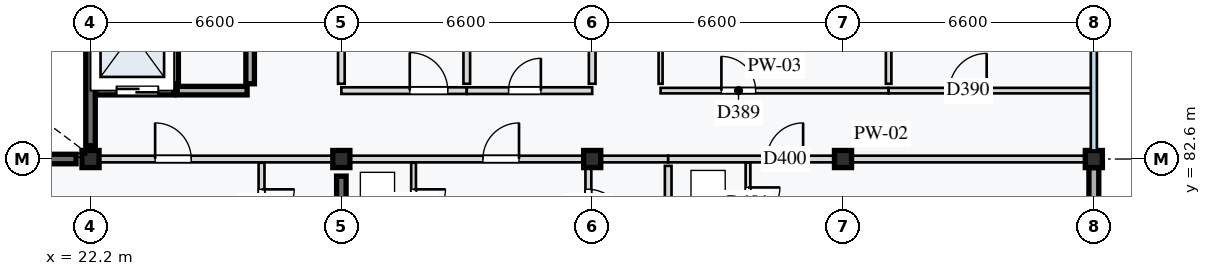
"""IFC4 building model, lengths in metres.
Left out: names, types, materials, properties, quantities, classifications, styles, units other than length and angle.
Written with IfcOpenShell. Run it as: python <this file> out.ifc"""

import sys

from ifc_helpers import new_model, si_unit, direction, frame, frame_2d, origin, origin_2d, place, context, subcontext, project, spatial, rectangle, extrude, element, fill, save


model = new_model("IFC4")
c1 = context("Model", 3, precision=1e-05, world=origin(), true_north=direction((0.0, 1.0)))
c2 = subcontext(c1, "Body", "Model", "MODEL_VIEW")
j1 = project(units=[si_unit("LENGTHUNIT", "METRE"), si_unit("PLANEANGLEUNIT", "RADIAN")], contexts=[c1])
p1 = place(None, origin())
s1 = spatial("IfcSite", under=j1, at=p1, CompositionType="ELEMENT")
p2 = place(p1, origin())
s2 = spatial("IfcBuilding", under=s1, at=p2, CompositionType="ELEMENT")
p3 = place(p2, frame((0.0, 0.0, 40.4)))
s3 = spatial("IfcBuildingStorey", under=s2, at=p3, CompositionType="ELEMENT", Elevation=40.4)
for number, where, z_axis, x_axis in (
    (1, (22.2, 82.6, 0.0), (0.0, 0.0, 1.0), (1.0, 0.0, 0.0)),
    (2, (28.8, 82.6, 0.0), (0.0, 0.0, 1.0), (1.0, 0.0, 0.0)),
    (3, (35.4, 82.6, 0.0), (0.0, 0.0, 1.0), (1.0, 0.0, 0.0)),
    (4, (42.0, 82.6, 0.0), (0.0, 0.0, 1.0), (1.0, 0.0, 0.0)),
    (5, (48.6, 82.6, 0.0), (0.0, 0.0, 1.0), (1.0, 0.0, 0.0)),
):
    element("IfcColumn", number, at=place(p3, frame(where, z_axis=z_axis, x_axis=x_axis)), inside=s3, PredefinedType="COLUMN", context=c2, shape_type="SweptSolid", body=[
        extrude(rectangle(XDim=0.45, YDim=0.45, at=origin_2d()), origin(), (0.0, 0.0, 1.0), 3.2),
    ])
p4 = place(p3, frame((15.98, 82.6, 0.0), z_axis=(0.0, 0.0, 1.0), x_axis=(1.0, 0.0, 0.0)))
e6 = element("IfcWall", 6, at=p4, inside=s3, PredefinedType="SHEAR", context=c2, shape_type="SweptSolid", body=[
    extrude(rectangle(XDim=5.84, YDim=0.25, at=frame_2d((2.92, 0.0))), origin(), (0.0, 0.0, 1.0), 2.98),
])
p5 = place(p3, frame((22.2, 82.95, 0.0), z_axis=(0.0, 0.0, 1.0), x_axis=(0.0, 1.0, 0.0)))
e7 = element("IfcWall", 7, at=p5, inside=s3, PredefinedType="SHEAR", context=c2, shape_type="SweptSolid", body=[
    extrude(rectangle(XDim=2.8, YDim=0.25, at=frame_2d((1.4, 0.0))), origin(), (0.0, 0.0, 1.0), 2.98),
])
p6 = place(p3, frame((28.8, 76.45, 0.0), z_axis=(0.0, 0.0, 1.0), x_axis=(0.0, 1.0, 0.0)))
e8 = element("IfcWall", 8, at=p6, inside=s3, PredefinedType="SHEAR", context=c2, shape_type="SweptSolid", body=[
    extrude(rectangle(XDim=5.7, YDim=0.25, at=frame_2d((2.85, 0.0))), origin(), (0.0, 0.0, 1.0), 2.98),
])
p7 = place(p3, frame((48.6, 76.225, 0.0), z_axis=(0.0, 0.0, 1.0), x_axis=(0.0, 1.0, 0.0)))
e9 = element("IfcWall", 9, at=p7, inside=s3, PredefinedType="STANDARD", context=c2, shape_type="SweptSolid", body=[
    extrude(rectangle(XDim=6.15, YDim=0.26, at=frame_2d((3.075, 0.0))), origin(), (0.0, 0.0, 1.0), 2.65),
])
p8 = place(p3, frame((22.335, 84.4, 0.0), z_axis=(0.0, 0.0, 1.0), x_axis=(1.0, 0.0, 0.0)))
e10 = element("IfcWall", 10, at=p8, inside=s3, PredefinedType="STANDARD", context=c2, shape_type="SweptSolid", body=[
    extrude(rectangle(XDim=2.065, YDim=0.225, at=frame_2d((1.032, 0.0))), origin(), (0.0, 0.0, 1.0), 2.98),
])
p9 = place(p8, frame((0.55, 0.0, 0.0)))
e11 = element("IfcOpeningElement", 11, at=p9, cuts=e10, PredefinedType="OPENING", context=c2, shape_type="SweptSolid", body=[
    extrude(rectangle(XDim=1.1, YDim=2.1, at=frame_2d((0.55, 1.05))), frame((0.0, 0.123, 0.0), z_axis=(0.0, -1.0, 0.0), x_axis=(1.0, 0.0, 0.0)), (0.0, 0.0, 1.0), 0.245),
])
p10 = place(p3, frame((24.48, 84.4, 0.0), z_axis=(0.0, 0.0, 1.0), x_axis=(1.0, 0.0, 0.0)))
e12 = element("IfcWall", 12, at=p10, inside=s3, PredefinedType="STANDARD", context=c2, shape_type="SweptSolid", body=[
    extrude(rectangle(XDim=1.84, YDim=0.225, at=frame_2d((0.92, 0.0))), origin(), (0.0, 0.0, 1.0), 2.98),
])
for number, where, z_axis, x_axis in (
    (13, (24.4, 84.58, 0.0), (0.0, 0.0, 1.0), (0.0, 1.0, 0.0)),
    (14, (26.4, 84.58, 0.0), (0.0, 0.0, 1.0), (0.0, 1.0, 0.0)),
):
    element("IfcWall", number, at=place(p3, frame(where, z_axis=z_axis, x_axis=x_axis)), inside=s3, PredefinedType="STANDARD", context=c2, shape_type="SweptSolid", body=[
        extrude(rectangle(XDim=2.64, YDim=0.225, at=frame_2d((1.32, 0.0))), origin(), (0.0, 0.0, 1.0), 2.98),
    ])
p11 = place(p3, frame((28.8, 84.4, 0.0), z_axis=(0.0, 0.0, 1.0), x_axis=(1.0, 0.0, 0.0)))
e15 = element("IfcWall", 15, at=p11, inside=s3, PredefinedType="PARTITIONING", context=c2, shape_type="SweptSolid", body=[
    extrude(rectangle(XDim=3.3, YDim=0.175, at=frame_2d((1.65, 0.0))), origin(), (0.0, 0.0, 1.0), 2.98),
])
p12 = place(p11, frame((1.8, 0.0, 0.0)))
e16 = element("IfcOpeningElement", 16, at=p12, cuts=e15, PredefinedType="OPENING", context=c2, shape_type="SweptSolid", body=[
    extrude(rectangle(XDim=1.0, YDim=2.1, at=frame_2d((0.5, 1.05))), frame((0.0, 0.097, 0.0), z_axis=(0.0, -1.0, 0.0), x_axis=(1.0, 0.0, 0.0)), (0.0, 0.0, 1.0), 0.195),
])
p13 = place(p3, frame((32.1, 84.4, 0.0), z_axis=(0.0, 0.0, 1.0), x_axis=(1.0, 0.0, 0.0)))
e17 = element("IfcWall", 17, at=p13, inside=s3, PredefinedType="PARTITIONING", context=c2, shape_type="SweptSolid", body=[
    extrude(rectangle(XDim=3.3, YDim=0.175, at=frame_2d((1.65, 0.0))), origin(), (0.0, 0.0, 1.0), 2.98),
])
p14 = place(p13, frame((1.1, 0.0, 0.0)))
e18 = element("IfcOpeningElement", 18, at=p14, cuts=e17, PredefinedType="OPENING", context=c2, shape_type="SweptSolid", body=[
    extrude(rectangle(XDim=0.85, YDim=2.0, at=frame_2d((0.425, 1.0))), frame((0.0, 0.097, 0.0), z_axis=(0.0, -1.0, 0.0), x_axis=(1.0, 0.0, 0.0)), (0.0, 0.0, 1.0), 0.195),
])
for number, where, z_axis, x_axis in (
    (19, (28.8, 84.58, 0.0), (0.0, 0.0, 1.0), (0.0, 1.0, 0.0)),
    (20, (32.1, 84.58, 0.0), (0.0, 0.0, 1.0), (0.0, 1.0, 0.0)),
    (21, (35.4, 84.58, 0.0), (0.0, 0.0, 1.0), (0.0, 1.0, 0.0)),
):
    element("IfcWall", number, at=place(p3, frame(where, z_axis=z_axis, x_axis=x_axis)), inside=s3, PredefinedType="PARTITIONING", context=c2, shape_type="SweptSolid", body=[
        extrude(rectangle(XDim=1.14, YDim=0.175, at=frame_2d((0.57, 0.0))), origin(), (0.0, 0.0, 1.0), 2.98),
    ])
p15 = place(p3, frame((37.2, 84.4, 0.0), z_axis=(0.0, 0.0, 1.0), x_axis=(1.0, 0.0, 0.0)))
e22 = element("IfcWall", 22, at=p15, inside=s3, PredefinedType="PARTITIONING", context=c2, shape_type="SweptSolid", body=[
    extrude(rectangle(XDim=6.0, YDim=0.145, at=frame_2d((3.0, 0.0))), origin(), (0.0, 0.0, 1.0), 2.98),
])
p16 = place(p15, frame((1.6, 0.0, 0.0)))
e23 = element("IfcOpeningElement", 23, at=p16, cuts=e22, PredefinedType="OPENING", context=c2, shape_type="SweptSolid", body=[
    extrude(rectangle(XDim=0.9, YDim=2.16, at=frame_2d((0.45, 1.08))), frame((0.0, 0.083, 0.0), z_axis=(0.0, -1.0, 0.0), x_axis=(1.0, 0.0, 0.0)), (0.0, 0.0, 1.0), 0.165),
])
p17 = place(p3, frame((43.2, 84.4, 0.0), z_axis=(0.0, 0.0, 1.0), x_axis=(1.0, 0.0, 0.0)))
e24 = element("IfcWall", 24, at=p17, inside=s3, PredefinedType="PARTITIONING", context=c2, shape_type="SweptSolid", body=[
    extrude(rectangle(XDim=5.4, YDim=0.145, at=frame_2d((2.7, 0.0))), origin(), (0.0, 0.0, 1.0), 2.98),
])
p18 = place(p17, frame((1.6, 0.0, 0.0)))
e25 = element("IfcOpeningElement", 25, at=p18, cuts=e24, PredefinedType="OPENING", context=c2, shape_type="SweptSolid", body=[
    extrude(rectangle(XDim=0.98, YDim=2.12, at=frame_2d((0.49, 1.06))), frame((0.0, 0.083, 0.0), z_axis=(0.0, -1.0, 0.0), x_axis=(1.0, 0.0, 0.0)), (0.0, 0.0, 1.0), 0.165),
])
p19 = place(p3, frame((43.2, 84.58, 0.0), z_axis=(0.0, 0.0, 1.0), x_axis=(0.0, 1.0, 0.0)))
e26 = element("IfcWall", 26, at=p19, inside=s3, PredefinedType="PARTITIONING", context=c2, shape_type="SweptSolid", body=[
    extrude(rectangle(XDim=2.64, YDim=0.145, at=frame_2d((1.32, 0.0))), origin(), (0.0, 0.0, 1.0), 2.98),
])
p20 = place(p3, frame((37.2, 84.58, 0.0), z_axis=(0.0, 0.0, 1.0), x_axis=(0.0, 1.0, 0.0)))
e27 = element("IfcWall", 27, at=p20, inside=s3, PredefinedType="PARTITIONING", context=c2, shape_type="SweptSolid", body=[
    extrude(rectangle(XDim=2.64, YDim=0.105, at=frame_2d((1.32, 0.0))), origin(), (0.0, 0.0, 1.0), 2.98),
])
p21 = place(p3, frame((22.2, 82.6, 0.0), z_axis=(0.0, 0.0, 1.0), x_axis=(1.0, 0.0, 0.0)))
e28 = element("IfcWall", 28, at=p21, inside=s3, PredefinedType="PARTITIONING", context=c2, shape_type="SweptSolid", body=[
    extrude(rectangle(XDim=6.6, YDim=0.175, at=frame_2d((3.3, 0.0))), origin(), (0.0, 0.0, 1.0), 2.55),
])
p22 = place(p21, frame((1.7, 0.0, 0.0)))
e29 = element("IfcOpeningElement", 29, at=p22, cuts=e28, PredefinedType="OPENING", context=c2, shape_type="SweptSolid", body=[
    extrude(rectangle(XDim=0.95, YDim=2.1, at=frame_2d((0.475, 1.05))), frame((0.0, 0.097, 0.0), z_axis=(0.0, -1.0, 0.0), x_axis=(1.0, 0.0, 0.0)), (0.0, 0.0, 1.0), 0.195),
])
p23 = place(p3, frame((26.7, 82.502, 0.0), z_axis=(0.0, 0.0, 1.0), x_axis=(0.0, -1.0, 0.0)))
e30 = element("IfcWall", 30, at=p23, inside=s3, PredefinedType="PARTITIONING", context=c2, shape_type="SweptSolid", body=[
    extrude(rectangle(XDim=2.302, YDim=0.155, at=frame_2d((1.151, 0.0))), origin(), (0.0, 0.0, 1.0), 2.98),
])
p24 = place(p23, frame((0.7, 0.0, 0.0)))
e31 = element("IfcOpeningElement", 31, at=p24, cuts=e30, PredefinedType="OPENING", context=c2, shape_type="SweptSolid", body=[
    extrude(rectangle(XDim=0.86, YDim=2.12, at=frame_2d((0.43, 1.06))), frame((0.0, 0.087, 0.0), z_axis=(0.0, -1.0, 0.0), x_axis=(1.0, 0.0, 0.0)), (0.0, 0.0, 1.0), 0.175),
])
p25 = place(p3, frame((28.8, 82.6, 0.0), z_axis=(0.0, 0.0, 1.0), x_axis=(1.0, 0.0, 0.0)))
e32 = element("IfcWall", 32, at=p25, inside=s3, PredefinedType="PARTITIONING", context=c2, shape_type="SweptSolid", body=[
    extrude(rectangle(XDim=8.6, YDim=0.175, at=frame_2d((4.3, 0.0))), origin(), (0.0, 0.0, 1.0), 2.55),
])
p26 = place(p25, frame((3.725, 0.0, 0.0)))
e33 = element("IfcOpeningElement", 33, at=p26, cuts=e32, PredefinedType="OPENING", context=c2, shape_type="SweptSolid", body=[
    extrude(rectangle(XDim=0.95, YDim=2.16, at=frame_2d((0.475, 1.08))), frame((0.0, 0.097, 0.0), z_axis=(0.0, -1.0, 0.0), x_axis=(1.0, 0.0, 0.0)), (0.0, 0.0, 1.0), 0.195),
])
p27 = place(p3, frame((30.7, 82.502, 0.0), z_axis=(0.0, 0.0, 1.0), x_axis=(0.0, -1.0, 0.0)))
e34 = element("IfcWall", 34, at=p27, inside=s3, PredefinedType="PARTITIONING", context=c2, shape_type="SweptSolid", body=[
    extrude(rectangle(XDim=2.302, YDim=0.125, at=frame_2d((1.151, 0.0))), origin(), (0.0, 0.0, 1.0), 2.98),
])
p28 = place(p27, frame((0.7, 0.0, 0.0)))
e35 = element("IfcOpeningElement", 35, at=p28, cuts=e34, PredefinedType="OPENING", context=c2, shape_type="SweptSolid", body=[
    extrude(rectangle(XDim=0.84, YDim=2.06, at=frame_2d((0.42, 1.03))), frame((0.0, 0.073, 0.0), z_axis=(0.0, -1.0, 0.0), x_axis=(1.0, 0.0, 0.0)), (0.0, 0.0, 1.0), 0.145),
])
p29 = place(p3, frame((35.3, 82.502, 0.0), z_axis=(0.0, 0.0, 1.0), x_axis=(0.0, -1.0, 0.0)))
e36 = element("IfcWall", 36, at=p29, inside=s3, PredefinedType="PARTITIONING", context=c2, shape_type="SweptSolid", body=[
    extrude(rectangle(XDim=2.302, YDim=0.155, at=frame_2d((1.151, 0.0))), origin(), (0.0, 0.0, 1.0), 2.98),
])
p30 = place(p29, frame((0.7, 0.0, 0.0)))
e37 = element("IfcOpeningElement", 37, at=p30, cuts=e36, PredefinedType="OPENING", context=c2, shape_type="SweptSolid", body=[
    extrude(rectangle(XDim=0.9, YDim=2.16, at=frame_2d((0.45, 1.08))), frame((0.0, 0.087, 0.0), z_axis=(0.0, -1.0, 0.0), x_axis=(1.0, 0.0, 0.0)), (0.0, 0.0, 1.0), 0.175),
])
p31 = place(p3, frame((37.4, 82.42, 0.0), z_axis=(0.0, 0.0, 1.0), x_axis=(0.0, -1.0, 0.0)))
e38 = element("IfcWall", 38, at=p31, inside=s3, PredefinedType="PARTITIONING", context=c2, shape_type="SweptSolid", body=[
    extrude(rectangle(XDim=2.132, YDim=0.175, at=frame_2d((1.066, 0.0))), origin(), (0.0, 0.0, 1.0), 2.98),
])
p32 = place(p3, frame((37.4, 82.6, 0.0), z_axis=(0.0, 0.0, 1.0), x_axis=(1.0, 0.0, 0.0)))
e39 = element("IfcWall", 39, at=p32, inside=s3, PredefinedType="PARTITIONING", context=c2, shape_type="SweptSolid", body=[
    extrude(rectangle(XDim=11.2, YDim=0.175, at=frame_2d((5.6, 0.0))), origin(), (0.0, 0.0, 1.0), 2.55),
])
p33 = place(p32, frame((2.6, 0.0, 0.0)))
e40 = element("IfcOpeningElement", 40, at=p33, cuts=e39, PredefinedType="OPENING", context=c2, shape_type="SweptSolid", body=[
    extrude(rectangle(XDim=0.95, YDim=2.16, at=frame_2d((0.475, 1.08))), frame((0.0, 0.097, 0.0), z_axis=(0.0, -1.0, 0.0), x_axis=(1.0, 0.0, 0.0)), (0.0, 0.0, 1.0), 0.195),
])
p34 = place(p3, frame((39.5, 82.502, 0.0), z_axis=(0.0, 0.0, 1.0), x_axis=(0.0, -1.0, 0.0)))
e41 = element("IfcWall", 41, at=p34, inside=s3, PredefinedType="PARTITIONING", context=c2, shape_type="SweptSolid", body=[
    extrude(rectangle(XDim=2.202, YDim=0.125, at=frame_2d((1.101, 0.0))), origin(), (0.0, 0.0, 1.0), 2.98),
])
p35 = place(p34, frame((0.65, 0.0, 0.0)))
e42 = element("IfcOpeningElement", 42, at=p35, cuts=e41, PredefinedType="OPENING", context=c2, shape_type="SweptSolid", body=[
    extrude(rectangle(XDim=0.84, YDim=2.06, at=frame_2d((0.42, 1.03))), frame((0.0, 0.073, 0.0), z_axis=(0.0, -1.0, 0.0), x_axis=(1.0, 0.0, 0.0)), (0.0, 0.0, 1.0), 0.145),
])
p36 = place(p9, origin())
e43 = element("IfcDoor", 43, at=p36, inside=s3, OperationType="DOUBLE_DOOR_SLIDING", PredefinedType="DOOR", context=c2, shape_type="SweptSolid", body=[
    extrude(rectangle(XDim=1.1, YDim=2.1, at=frame_2d((0.55, 1.05))), frame((0.0, 0.025, 0.0), z_axis=(0.0, -1.0, 0.0), x_axis=(1.0, 0.0, 0.0)), (0.0, 0.0, 1.0), 0.05),
])
fill(e11, e43)
p37 = place(p12, origin())
e44 = element("IfcDoor", 44, at=p37, inside=s3, OperationType="SINGLE_SWING_LEFT", PredefinedType="DOOR", context=c2, shape_type="SweptSolid", body=[
    extrude(rectangle(XDim=1.0, YDim=2.1, at=frame_2d((0.5, 1.05))), frame((0.0, 0.025, 0.0), z_axis=(0.0, -1.0, 0.0), x_axis=(1.0, 0.0, 0.0)), (0.0, 0.0, 1.0), 0.05),
])
fill(e16, e44)
p38 = place(p14, origin())
e45 = element("IfcDoor", 45, at=p38, inside=s3, OperationType="SINGLE_SWING_RIGHT", PredefinedType="DOOR", context=c2, shape_type="SweptSolid", body=[
    extrude(rectangle(XDim=0.85, YDim=2.0, at=frame_2d((0.425, 1.0))), frame((0.0, 0.025, 0.0), z_axis=(0.0, -1.0, 0.0), x_axis=(1.0, 0.0, 0.0)), (0.0, 0.0, 1.0), 0.05),
])
fill(e18, e45)
p39 = place(p16, origin())
e46 = element("IfcDoor", 46, at=p39, inside=s3, OperationType="SINGLE_SWING_LEFT", PredefinedType="DOOR", context=c2, shape_type="SweptSolid", body=[
    extrude(rectangle(XDim=0.9, YDim=2.16, at=frame_2d((0.45, 1.08))), frame((0.0, 0.025, 0.0), z_axis=(0.0, -1.0, 0.0), x_axis=(1.0, 0.0, 0.0)), (0.0, 0.0, 1.0), 0.05),
])
fill(e23, e46)
p40 = place(p18, origin())
e47 = element("IfcDoor", 47, at=p40, inside=s3, OperationType="SINGLE_SWING_RIGHT", PredefinedType="DOOR", context=c2, shape_type="SweptSolid", body=[
    extrude(rectangle(XDim=0.98, YDim=2.12, at=frame_2d((0.49, 1.06))), frame((0.0, 0.025, 0.0), z_axis=(0.0, -1.0, 0.0), x_axis=(1.0, 0.0, 0.0)), (0.0, 0.0, 1.0), 0.05),
])
fill(e25, e47)
p41 = place(p22, origin())
e48 = element("IfcDoor", 48, at=p41, inside=s3, OperationType="SINGLE_SWING_LEFT", PredefinedType="DOOR", context=c2, shape_type="SweptSolid", body=[
    extrude(rectangle(XDim=0.95, YDim=2.1, at=frame_2d((0.475, 1.05))), frame((0.0, 0.025, 0.0), z_axis=(0.0, -1.0, 0.0), x_axis=(1.0, 0.0, 0.0)), (0.0, 0.0, 1.0), 0.05),
])
fill(e29, e48)
p42 = place(p24, origin())
e49 = element("IfcDoor", 49, at=p42, inside=s3, OperationType="SINGLE_SWING_LEFT", PredefinedType="DOOR", context=c2, shape_type="SweptSolid", body=[
    extrude(rectangle(XDim=0.86, YDim=2.12, at=frame_2d((0.43, 1.06))), frame((0.0, 0.025, 0.0), z_axis=(0.0, -1.0, 0.0), x_axis=(1.0, 0.0, 0.0)), (0.0, 0.0, 1.0), 0.05),
])
fill(e31, e49)
p43 = place(p26, origin())
e50 = element("IfcDoor", 50, at=p43, inside=s3, OperationType="SINGLE_SWING_RIGHT", PredefinedType="DOOR", context=c2, shape_type="SweptSolid", body=[
    extrude(rectangle(XDim=0.95, YDim=2.16, at=frame_2d((0.475, 1.08))), frame((0.0, 0.025, 0.0), z_axis=(0.0, -1.0, 0.0), x_axis=(1.0, 0.0, 0.0)), (0.0, 0.0, 1.0), 0.05),
])
fill(e33, e50)
p44 = place(p28, origin())
e51 = element("IfcDoor", 51, at=p44, inside=s3, OperationType="SINGLE_SWING_LEFT", PredefinedType="DOOR", context=c2, shape_type="SweptSolid", body=[
    extrude(rectangle(XDim=0.84, YDim=2.06, at=frame_2d((0.42, 1.03))), frame((0.0, 0.025, 0.0), z_axis=(0.0, -1.0, 0.0), x_axis=(1.0, 0.0, 0.0)), (0.0, 0.0, 1.0), 0.05),
])
fill(e35, e51)
p45 = place(p30, origin())
e52 = element("IfcDoor", 52, at=p45, inside=s3, OperationType="SINGLE_SWING_RIGHT", PredefinedType="DOOR", context=c2, shape_type="SweptSolid", body=[
    extrude(rectangle(XDim=0.9, YDim=2.16, at=frame_2d((0.45, 1.08))), frame((0.0, 0.025, 0.0), z_axis=(0.0, -1.0, 0.0), x_axis=(1.0, 0.0, 0.0)), (0.0, 0.0, 1.0), 0.05),
])
fill(e37, e52)
p46 = place(p33, origin())
e53 = element("IfcDoor", 53, at=p46, inside=s3, OperationType="SINGLE_SWING_RIGHT", PredefinedType="DOOR", context=c2, shape_type="SweptSolid", body=[
    extrude(rectangle(XDim=0.95, YDim=2.16, at=frame_2d((0.475, 1.08))), frame((0.0, 0.025, 0.0), z_axis=(0.0, -1.0, 0.0), x_axis=(1.0, 0.0, 0.0)), (0.0, 0.0, 1.0), 0.05),
])
fill(e40, e53)
p47 = place(p35, origin())
e54 = element("IfcDoor", 54, at=p47, inside=s3, OperationType="SINGLE_SWING_LEFT", PredefinedType="DOOR", context=c2, shape_type="SweptSolid", body=[
    extrude(rectangle(XDim=0.84, YDim=2.06, at=frame_2d((0.42, 1.03))), frame((0.0, 0.025, 0.0), z_axis=(0.0, -1.0, 0.0), x_axis=(1.0, 0.0, 0.0)), (0.0, 0.0, 1.0), 0.05),
])
fill(e42, e54)
save(model, sys.argv[1])
